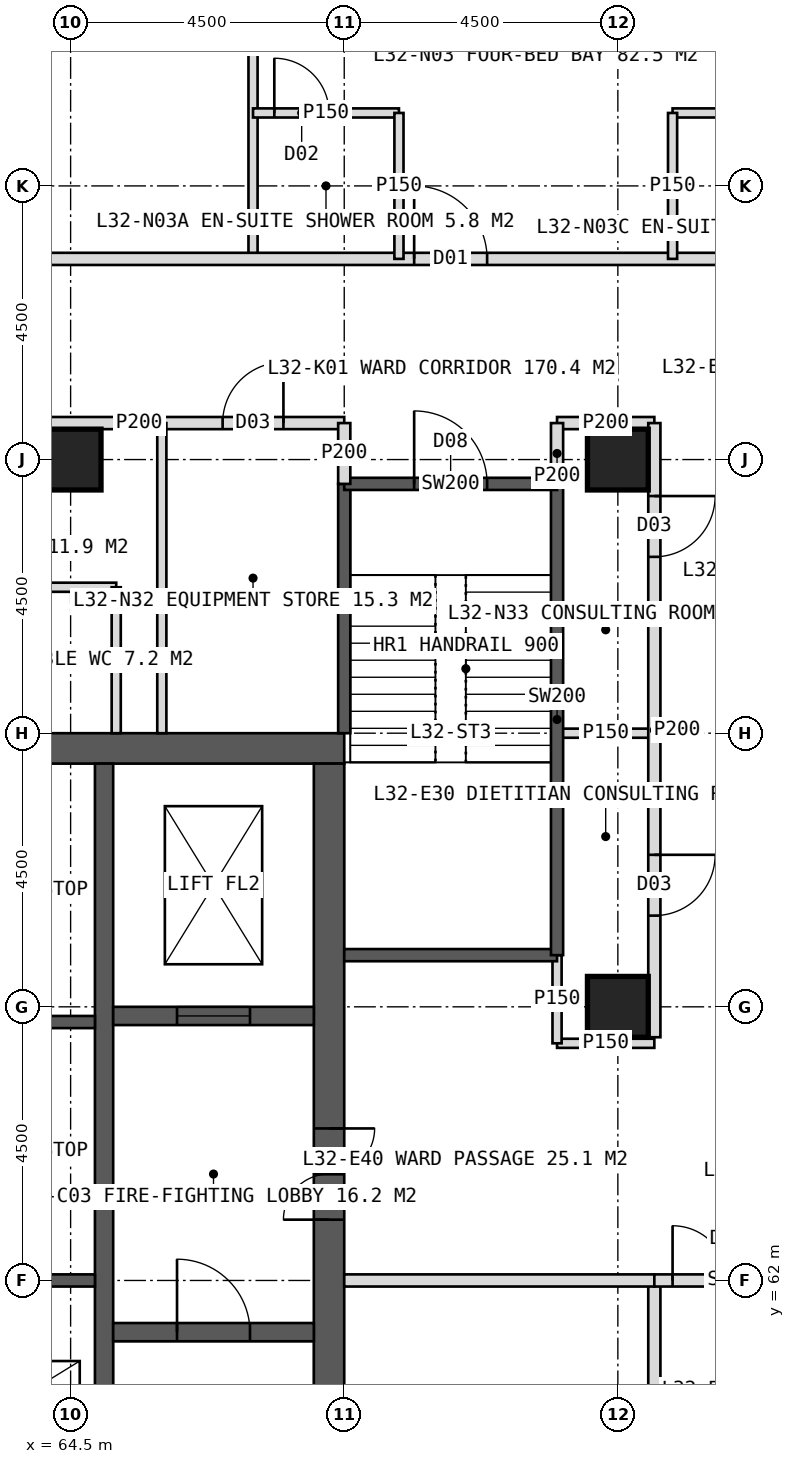
"""IFC4 building model, lengths in metres.
Left out: names, types, materials, properties, quantities, classifications, styles, units other than length and angle.
Written with IfcOpenShell. Run it as: python <this file> out.ifc"""

import sys

from ifc_helpers import new_model, si_unit, direction, frame, frame_2d, origin, origin_2d, place, context, subcontext, project, spatial, rectangle, hollow_rectangle, extrude, element, fill, save


model = new_model("IFC4")
c1 = context("Model", 3, precision=1e-05, world=origin(), true_north=direction((0.0, 1.0)))
c2 = subcontext(c1, "Body", "Model", "MODEL_VIEW")
j1 = project(units=[si_unit("LENGTHUNIT", "METRE"), si_unit("PLANEANGLEUNIT", "RADIAN")], contexts=[c1])
p1 = place(None, origin())
s1 = spatial("IfcSite", under=j1, at=p1, CompositionType="ELEMENT")
p2 = place(p1, origin())
s2 = spatial("IfcBuilding", under=s1, at=p2, CompositionType="ELEMENT")
p3 = place(p2, frame((0.0, 0.0, 136.0)))
s3 = spatial("IfcBuildingStorey", under=s2, at=p3, CompositionType="ELEMENT", Elevation=136.0)
p4 = place(p3, frame((51.0, 70.75, 0.0), z_axis=(0.0, 0.0, 1.0), x_axis=(1.0, 0.0, 0.0)))
e1 = element("IfcWall", 1, at=p4, inside=s3, PredefinedType="SHEAR", context=c2, shape_type="SweptSolid", body=[
    extrude(rectangle(XDim=18.0, YDim=0.5, at=frame_2d((9.0, 0.0))), origin(), (0.0, 0.0, 1.0), 4.0),
])
p5 = place(p4, frame((8.1, 0.0, 0.0)))
e2 = element("IfcOpeningElement", 2, at=p5, cuts=e1, PredefinedType="OPENING", context=c2, shape_type="SweptSolid", body=[
    extrude(rectangle(XDim=1.8, YDim=2.2, at=frame_2d((0.9, 1.1))), frame((0.0, 0.26, 0.0), z_axis=(0.0, -1.0, 0.0), x_axis=(1.0, 0.0, 0.0)), (0.0, 0.0, 1.0), 0.52),
])
p6 = place(p3, frame((68.75, 53.5, 0.0), z_axis=(0.0, 0.0, 1.0), x_axis=(0.0, 1.0, 0.0)))
e3 = element("IfcWall", 3, at=p6, inside=s3, PredefinedType="SHEAR", context=c2, shape_type="SweptSolid", body=[
    extrude(rectangle(XDim=17.0, YDim=0.5, at=frame_2d((8.5, 0.0))), origin(), (0.0, 0.0, 1.0), 4.0),
])
p7 = place(p6, frame((9.5, 0.0, 0.0)))
e4 = element("IfcOpeningElement", 4, at=p7, cuts=e3, PredefinedType="OPENING", context=c2, shape_type="SweptSolid", body=[
    extrude(rectangle(XDim=1.5, YDim=2.2, at=frame_2d((0.75, 1.1))), frame((0.0, 0.26, 0.0), z_axis=(0.0, -1.0, 0.0), x_axis=(1.0, 0.0, 0.0)), (0.0, 0.0, 1.0), 0.52),
])
p8 = place(p3, frame((65.05, 53.5, 0.0), z_axis=(0.0, 0.0, 1.0), x_axis=(0.0, 1.0, 0.0)))
e5 = element("IfcWall", 5, at=p8, inside=s3, PredefinedType="SHEAR", context=c2, shape_type="SweptSolid", body=[
    extrude(rectangle(XDim=17.0, YDim=0.3, at=frame_2d((8.5, 0.0))), origin(), (0.0, 0.0, 1.0), 4.0),
])
for number, where, z_axis, x_axis in (
    (6, (61.85, 62.0, 0.0), (0.0, 0.0, 1.0), (1.0, 0.0, 0.0)),
    (7, (61.85, 66.25, 0.0), (0.0, 0.0, 1.0), (1.0, 0.0, 0.0)),
):
    element("IfcWall", number, at=place(p3, frame(where, z_axis=z_axis, x_axis=x_axis)), inside=s3, PredefinedType="SHEAR", context=c2, shape_type="SweptSolid", body=[
        extrude(rectangle(XDim=3.05, YDim=0.2, at=frame_2d((1.525, 0.0))), origin(), (0.0, 0.0, 1.0), 4.0),
    ])
p9 = place(p3, frame((65.2, 61.15, 0.0), z_axis=(0.0, 0.0, 1.0), x_axis=(1.0, 0.0, 0.0)))
e8 = element("IfcWall", 8, at=p9, inside=s3, PredefinedType="SHEAR", context=c2, shape_type="SweptSolid", body=[
    extrude(rectangle(XDim=3.3, YDim=0.3, at=frame_2d((1.65, 0.0))), origin(), (0.0, 0.0, 1.0), 4.0),
])
p10 = place(p9, frame((1.05, 0.0, 0.0)))
e9 = element("IfcOpeningElement", 9, at=p10, cuts=e8, PredefinedType="OPENING", context=c2, shape_type="SweptSolid", body=[
    extrude(rectangle(XDim=1.2, YDim=2.1, at=frame_2d((0.6, 1.05))), frame((0.0, 0.16, 0.0), z_axis=(0.0, -1.0, 0.0), x_axis=(1.0, 0.0, 0.0)), (0.0, 0.0, 1.0), 0.32),
])
p11 = place(p3, frame((65.2, 66.35, 0.0), z_axis=(0.0, 0.0, 1.0), x_axis=(1.0, 0.0, 0.0)))
e10 = element("IfcWall", 10, at=p11, inside=s3, PredefinedType="SHEAR", context=c2, shape_type="SweptSolid", body=[
    extrude(rectangle(XDim=3.3, YDim=0.3, at=frame_2d((1.65, 0.0))), origin(), (0.0, 0.0, 1.0), 4.0),
])
p12 = place(p11, frame((1.05, 0.0, 0.0)))
e11 = element("IfcOpeningElement", 11, at=p12, cuts=e10, PredefinedType="OPENING", context=c2, shape_type="SweptSolid", body=[
    extrude(rectangle(XDim=1.2, YDim=2.2, at=frame_2d((0.6, 1.1))), frame((0.0, 0.16, 0.0), z_axis=(0.0, -1.0, 0.0), x_axis=(1.0, 0.0, 0.0)), (0.0, 0.0, 1.0), 0.32),
])
for number, where, z_axis, x_axis in (
    (12, (73.5, 75.5, 0.0), (0.0, 0.0, 1.0), (1.0, 0.0, 0.0)),
    (13, (64.5, 75.5, 0.0), (0.0, 0.0, 1.0), (1.0, 0.0, 0.0)),
    (14, (73.5, 66.5, 0.0), (0.0, 0.0, 1.0), (1.0, 0.0, 0.0)),
):
    element("IfcColumn", number, at=place(p3, frame(where, z_axis=z_axis, x_axis=x_axis)), inside=s3, PredefinedType="COLUMN", context=c2, shape_type="SweptSolid", body=[
        extrude(hollow_rectangle(XDim=1.0, YDim=1.0, WallThickness=0.1, at=origin_2d()), origin(), (0.0, 0.0, 1.0), 4.0),
    ])
p13 = place(p3, frame((67.5, 78.8, 0.0), z_axis=(0.0, 0.0, 1.0), x_axis=(0.0, 1.0, 0.0)))
e15 = element("IfcWall", 15, at=p13, inside=s3, PredefinedType="PARTITIONING", context=c2, shape_type="SweptSolid", body=[
    extrude(rectangle(XDim=7.11, YDim=0.15, at=frame_2d((3.555, 0.0))), origin(), (0.0, 0.0, 1.0), 3.75),
])
p14 = place(p3, frame((43.2, 78.8, 0.0), z_axis=(0.0, 0.0, 1.0), x_axis=(1.0, 0.0, 0.0)))
e16 = element("IfcWall", 16, at=p14, inside=s3, PredefinedType="PARTITIONING", context=c2, shape_type="SweptSolid", body=[
    extrude(rectangle(XDim=33.6, YDim=0.2, at=frame_2d((16.8, 0.0))), origin(), (0.0, 0.0, 1.0), 3.75),
])
p15 = place(p14, frame((3.25, 0.0, 0.0)))
e17 = element("IfcOpeningElement", 17, at=p15, cuts=e16, PredefinedType="OPENING", context=c2, shape_type="SweptSolid", body=[
    extrude(rectangle(XDim=1.2, YDim=2.2, at=frame_2d((0.6, 1.1))), frame((0.0, 0.11, 0.0), z_axis=(0.0, -1.0, 0.0), x_axis=(1.0, 0.0, 0.0)), (0.0, 0.0, 1.0), 0.22),
])
p16 = place(p14, frame((12.55, 0.0, 0.0)))
e18 = element("IfcOpeningElement", 18, at=p16, cuts=e16, PredefinedType="OPENING", context=c2, shape_type="SweptSolid", body=[
    extrude(rectangle(XDim=1.2, YDim=2.2, at=frame_2d((0.6, 1.1))), frame((0.0, 0.11, 0.0), z_axis=(0.0, -1.0, 0.0), x_axis=(1.0, 0.0, 0.0)), (0.0, 0.0, 1.0), 0.22),
])
p17 = place(p14, frame((26.95, 0.0, 0.0)))
e19 = element("IfcOpeningElement", 19, at=p17, cuts=e16, PredefinedType="OPENING", context=c2, shape_type="SweptSolid", body=[
    extrude(rectangle(XDim=1.2, YDim=2.2, at=frame_2d((0.6, 1.1))), frame((0.0, 0.11, 0.0), z_axis=(0.0, -1.0, 0.0), x_axis=(1.0, 0.0, 0.0)), (0.0, 0.0, 1.0), 0.22),
])
p18 = place(p3, frame((67.5, 81.2, 0.0), z_axis=(0.0, 0.0, 1.0), x_axis=(1.0, 0.0, 0.0)))
e20 = element("IfcWall", 20, at=p18, inside=s3, PredefinedType="PARTITIONING", context=c2, shape_type="SweptSolid", body=[
    extrude(rectangle(XDim=2.4, YDim=0.15, at=frame_2d((1.2, 0.0))), origin(), (0.0, 0.0, 1.0), 3.75),
])
p19 = place(p18, frame((0.35, 0.0, 0.0)))
e21 = element("IfcOpeningElement", 21, at=p19, cuts=e20, PredefinedType="OPENING", context=c2, shape_type="SweptSolid", body=[
    extrude(rectangle(XDim=0.9, YDim=2.1, at=frame_2d((0.45, 1.05))), frame((0.0, 0.085, 0.0), z_axis=(0.0, -1.0, 0.0), x_axis=(1.0, 0.0, 0.0)), (0.0, 0.0, 1.0), 0.17),
])
p20 = place(p3, frame((69.9, 78.8, 0.0), z_axis=(0.0, 0.0, 1.0), x_axis=(0.0, 1.0, 0.0)))
e22 = element("IfcWall", 22, at=p20, inside=s3, PredefinedType="PARTITIONING", context=c2, shape_type="SweptSolid", body=[
    extrude(rectangle(XDim=2.4, YDim=0.15, at=frame_2d((1.2, 0.0))), origin(), (0.0, 0.0, 1.0), 3.75),
])
p21 = place(p3, frame((74.4, 81.2, 0.0), z_axis=(0.0, 0.0, 1.0), x_axis=(1.0, 0.0, 0.0)))
e23 = element("IfcWall", 23, at=p21, inside=s3, PredefinedType="PARTITIONING", context=c2, shape_type="SweptSolid", body=[
    extrude(rectangle(XDim=2.4, YDim=0.15, at=frame_2d((1.2, 0.0))), origin(), (0.0, 0.0, 1.0), 2.997),
])
p22 = place(p21, frame((1.15, 0.0, 0.0)))
e24 = element("IfcOpeningElement", 24, at=p22, cuts=e23, PredefinedType="OPENING", context=c2, shape_type="SweptSolid", body=[
    extrude(rectangle(XDim=0.9, YDim=2.1, at=frame_2d((0.45, 1.05))), frame((0.0, 0.085, 0.0), z_axis=(0.0, -1.0, 0.0), x_axis=(1.0, 0.0, 0.0)), (0.0, 0.0, 1.0), 0.17),
])
p23 = place(p3, frame((74.4, 78.8, 0.0), z_axis=(0.0, 0.0, 1.0), x_axis=(0.0, 1.0, 0.0)))
e25 = element("IfcWall", 25, at=p23, inside=s3, PredefinedType="PARTITIONING", context=c2, shape_type="SweptSolid", body=[
    extrude(rectangle(XDim=2.4, YDim=0.15, at=frame_2d((1.2, 0.0))), origin(), (0.0, 0.0, 1.0), 3.75),
])
p24 = place(p3, frame((62.25, 76.1, 0.0), z_axis=(0.0, 0.0, 1.0), x_axis=(1.0, 0.0, 0.0)))
e26 = element("IfcWall", 26, at=p24, inside=s3, PredefinedType="PARTITIONING", context=c2, shape_type="SweptSolid", body=[
    extrude(rectangle(XDim=6.75, YDim=0.2, at=frame_2d((3.375, 0.0))), origin(), (0.0, 0.0, 1.0), 3.75),
])
p25 = place(p24, frame((0.325, 0.0, 0.0)))
e27 = element("IfcOpeningElement", 27, at=p25, cuts=e26, PredefinedType="OPENING", context=c2, shape_type="SweptSolid", body=[
    extrude(rectangle(XDim=1.0, YDim=2.1, at=frame_2d((0.5, 1.05))), frame((0.0, 0.11, 0.0), z_axis=(0.0, -1.0, 0.0), x_axis=(1.0, 0.0, 0.0)), (0.0, 0.0, 1.0), 0.22),
])
p26 = place(p24, frame((4.75, 0.0, 0.0)))
e28 = element("IfcOpeningElement", 28, at=p26, cuts=e26, PredefinedType="OPENING", context=c2, shape_type="SweptSolid", body=[
    extrude(rectangle(XDim=1.0, YDim=2.1, at=frame_2d((0.5, 1.05))), frame((0.0, 0.11, 0.0), z_axis=(0.0, -1.0, 0.0), x_axis=(1.0, 0.0, 0.0)), (0.0, 0.0, 1.0), 0.22),
])
p27 = place(p3, frame((72.5, 76.1, 0.0), z_axis=(0.0, 0.0, 1.0), x_axis=(1.0, 0.0, 0.0)))
e29 = element("IfcWall", 29, at=p27, inside=s3, PredefinedType="PARTITIONING", context=c2, shape_type="SweptSolid", body=[
    extrude(rectangle(XDim=1.6, YDim=0.2, at=frame_2d((0.8, 0.0))), origin(), (0.0, 0.0, 1.0), 3.75),
])
p28 = place(p3, frame((66.0, 71.0, 0.0), z_axis=(0.0, 0.0, 1.0), x_axis=(0.0, 1.0, 0.0)))
e30 = element("IfcWall", 30, at=p28, inside=s3, PredefinedType="PARTITIONING", context=c2, shape_type="SweptSolid", body=[
    extrude(rectangle(XDim=5.1, YDim=0.15, at=frame_2d((2.55, 0.0))), origin(), (0.0, 0.0, 1.0), 3.75),
])
p29 = place(p3, frame((62.25, 73.4, 0.0), z_axis=(0.0, 0.0, 1.0), x_axis=(1.0, 0.0, 0.0)))
e31 = element("IfcWall", 31, at=p29, inside=s3, PredefinedType="PARTITIONING", context=c2, shape_type="SweptSolid", body=[
    extrude(rectangle(XDim=3.0, YDim=0.15, at=frame_2d((1.5, 0.0))), origin(), (0.0, 0.0, 1.0), 3.75),
])
p30 = place(p3, frame((65.25, 71.0, 0.0), z_axis=(0.0, 0.0, 1.0), x_axis=(0.0, 1.0, 0.0)))
e32 = element("IfcWall", 32, at=p30, inside=s3, PredefinedType="PARTITIONING", context=c2, shape_type="SweptSolid", body=[
    extrude(rectangle(XDim=2.4, YDim=0.15, at=frame_2d((1.2, 0.0))), origin(), (0.0, 0.0, 1.0), 3.75),
])
p31 = place(p3, frame((72.5, 71.0, 0.0), z_axis=(0.0, 0.0, 1.0), x_axis=(1.0, 0.0, 0.0)))
e33 = element("IfcWall", 33, at=p31, inside=s3, PredefinedType="PARTITIONING", context=c2, shape_type="SweptSolid", body=[
    extrude(rectangle(XDim=1.6, YDim=0.15, at=frame_2d((0.8, 0.0))), origin(), (0.0, 0.0, 1.0), 3.75),
])
p32 = place(p3, frame((74.1, 76.1, 0.0), z_axis=(0.0, 0.0, 1.0), x_axis=(0.0, -1.0, 0.0)))
e34 = element("IfcWall", 34, at=p32, inside=s3, PredefinedType="PARTITIONING", context=c2, shape_type="SweptSolid", body=[
    extrude(rectangle(XDim=10.1, YDim=0.2, at=frame_2d((5.05, 0.0))), origin(), (0.0, 0.0, 1.0), 3.75),
])
p33 = place(p32, frame((1.2, 0.0, 0.0)))
e35 = element("IfcOpeningElement", 35, at=p33, cuts=e34, PredefinedType="OPENING", context=c2, shape_type="SweptSolid", body=[
    extrude(rectangle(XDim=1.0, YDim=2.1, at=frame_2d((0.5, 1.05))), frame((0.0, 0.11, 0.0), z_axis=(0.0, -1.0, 0.0), x_axis=(1.0, 0.0, 0.0)), (0.0, 0.0, 1.0), 0.22),
])
p34 = place(p32, frame((7.1, 0.0, 0.0)))
e36 = element("IfcOpeningElement", 36, at=p34, cuts=e34, PredefinedType="OPENING", context=c2, shape_type="SweptSolid", body=[
    extrude(rectangle(XDim=1.0, YDim=2.1, at=frame_2d((0.5, 1.05))), frame((0.0, 0.11, 0.0), z_axis=(0.0, -1.0, 0.0), x_axis=(1.0, 0.0, 0.0)), (0.0, 0.0, 1.0), 0.22),
])
p35 = place(p3, frame((74.1, 62.0, 0.0), z_axis=(0.0, 0.0, 1.0), x_axis=(0.0, -1.0, 0.0)))
e37 = element("IfcWall", 37, at=p35, inside=s3, PredefinedType="PARTITIONING", context=c2, shape_type="SweptSolid", body=[
    extrude(rectangle(XDim=14.1, YDim=0.2, at=frame_2d((7.05, 0.0))), origin(), (0.0, 0.0, 1.0), 3.75),
])
p36 = place(p35, frame((2.5, 0.0, 0.0)))
e38 = element("IfcOpeningElement", 38, at=p36, cuts=e37, PredefinedType="OPENING", context=c2, shape_type="SweptSolid", body=[
    extrude(rectangle(XDim=1.0, YDim=2.1, at=frame_2d((0.5, 1.05))), frame((0.0, 0.11, 0.0), z_axis=(0.0, -1.0, 0.0), x_axis=(1.0, 0.0, 0.0)), (0.0, 0.0, 1.0), 0.22),
])
p37 = place(p35, frame((7.75, 0.0, 0.0)))
e39 = element("IfcOpeningElement", 39, at=p37, cuts=e37, PredefinedType="OPENING", context=c2, shape_type="SweptSolid", body=[
    extrude(rectangle(XDim=1.0, YDim=2.1, at=frame_2d((0.5, 1.05))), frame((0.0, 0.11, 0.0), z_axis=(0.0, -1.0, 0.0), x_axis=(1.0, 0.0, 0.0)), (0.0, 0.0, 1.0), 0.22),
])
p38 = place(p35, frame((11.2, 0.0, 0.0)))
e40 = element("IfcOpeningElement", 40, at=p38, cuts=e37, PredefinedType="OPENING", context=c2, shape_type="SweptSolid", body=[
    extrude(rectangle(XDim=1.0, YDim=2.1, at=frame_2d((0.5, 1.05))), frame((0.0, 0.11, 0.0), z_axis=(0.0, -1.0, 0.0), x_axis=(1.0, 0.0, 0.0)), (0.0, 0.0, 1.0), 0.22),
])
p39 = place(p3, frame((72.5, 65.9, 0.0), z_axis=(0.0, 0.0, 1.0), x_axis=(1.0, 0.0, 0.0)))
e41 = element("IfcWall", 41, at=p39, inside=s3, PredefinedType="PARTITIONING", context=c2, shape_type="SweptSolid", body=[
    extrude(rectangle(XDim=1.6, YDim=0.15, at=frame_2d((0.8, 0.0))), origin(), (0.0, 0.0, 1.0), 3.75),
])
p40 = place(p3, frame((69.0, 62.0, 0.0), z_axis=(0.0, 0.0, 1.0), x_axis=(1.0, 0.0, 0.0)))
e42 = element("IfcWall", 42, at=p40, inside=s3, PredefinedType="SOLIDWALL", context=c2, shape_type="SweptSolid", body=[
    extrude(rectangle(XDim=5.1, YDim=0.2, at=frame_2d((2.55, 0.0))), origin(), (0.0, 0.0, 1.0), 2.95),
])
p41 = place(p3, frame((74.1, 62.0, 0.0), z_axis=(0.0, 0.0, 1.0), x_axis=(1.0, 0.0, 0.0)))
e43 = element("IfcWall", 43, at=p41, inside=s3, PredefinedType="SOLIDWALL", context=c2, shape_type="SweptSolid", body=[
    extrude(rectangle(XDim=2.7, YDim=0.2, at=frame_2d((1.35, 0.0))), origin(), (0.0, 0.0, 1.0), 2.95),
])
p42 = place(p41, frame((0.3, 0.0, 0.0)))
e44 = element("IfcOpeningElement", 44, at=p42, cuts=e43, PredefinedType="OPENING", context=c2, shape_type="SweptSolid", body=[
    extrude(rectangle(XDim=1.8, YDim=2.2, at=frame_2d((0.9, 1.1))), frame((0.0, 0.11, 0.0), z_axis=(0.0, -1.0, 0.0), x_axis=(1.0, 0.0, 0.0)), (0.0, 0.0, 1.0), 0.22),
])
p43 = place(p3, frame((72.5, 65.9, 0.0), z_axis=(0.0, 0.0, 1.0), x_axis=(0.0, 1.0, 0.0)))
e45 = element("IfcWall", 45, at=p43, inside=s3, PredefinedType="PARTITIONING", context=c2, shape_type="SweptSolid", body=[
    extrude(rectangle(XDim=1.45, YDim=0.15, at=frame_2d((0.725, 0.0))), origin(), (0.0, 0.0, 1.0), 3.75),
])
p44 = place(p3, frame((69.0, 71.0, 0.0), z_axis=(0.0, 0.0, 1.0), x_axis=(0.0, 1.0, 0.0)))
e46 = element("IfcWall", 46, at=p44, inside=s3, PredefinedType="SOLIDWALL", context=c2, shape_type="SweptSolid", body=[
    extrude(rectangle(XDim=4.1, YDim=0.2, at=frame_2d((2.05, 0.0))), origin(), (0.0, 0.0, 1.0), 3.75),
])
p45 = place(p3, frame((69.0, 67.35, 0.0), z_axis=(0.0, 0.0, 1.0), x_axis=(1.0, 0.0, 0.0)))
e47 = element("IfcWall", 47, at=p45, inside=s3, PredefinedType="SOLIDWALL", context=c2, shape_type="SweptSolid", body=[
    extrude(rectangle(XDim=3.5, YDim=0.2, at=frame_2d((1.75, 0.0))), origin(), (0.0, 0.0, 1.0), 3.75),
])
p46 = place(p3, frame((72.5, 67.35, 0.0), z_axis=(0.0, 0.0, 1.0), x_axis=(0.0, 1.0, 0.0)))
e48 = element("IfcWall", 48, at=p46, inside=s3, PredefinedType="SOLIDWALL", context=c2, shape_type="SweptSolid", body=[
    extrude(rectangle(XDim=7.75, YDim=0.2, at=frame_2d((3.875, 0.0))), origin(), (0.0, 0.0, 1.0), 3.75),
])
p47 = place(p3, frame((69.0, 75.1, 0.0), z_axis=(0.0, 0.0, 1.0), x_axis=(1.0, 0.0, 0.0)))
e49 = element("IfcWall", 49, at=p47, inside=s3, PredefinedType="SOLIDWALL", context=c2, shape_type="SweptSolid", body=[
    extrude(rectangle(XDim=3.5, YDim=0.2, at=frame_2d((1.75, 0.0))), origin(), (0.0, 0.0, 1.0), 3.75),
])
p48 = place(p47, frame((1.15, 0.0, 0.0)))
e50 = element("IfcOpeningElement", 50, at=p48, cuts=e49, PredefinedType="OPENING", context=c2, shape_type="SweptSolid", body=[
    extrude(rectangle(XDim=1.2, YDim=2.1, at=frame_2d((0.6, 1.05))), frame((0.0, 0.11, 0.0), z_axis=(0.0, -1.0, 0.0), x_axis=(1.0, 0.0, 0.0)), (0.0, 0.0, 1.0), 0.22),
])
for number, where, z_axis, x_axis in (
    (51, (69.0, 75.1, 0.0), (0.0, 0.0, 1.0), (0.0, 1.0, 0.0)),
    (52, (72.5, 75.1, 0.0), (0.0, 0.0, 1.0), (0.0, 1.0, 0.0)),
):
    element("IfcWall", number, at=place(p3, frame(where, z_axis=z_axis, x_axis=x_axis)), inside=s3, PredefinedType="PARTITIONING", context=c2, shape_type="SweptSolid", body=[
        extrude(rectangle(XDim=1.0, YDim=0.2, at=frame_2d((0.5, 0.0))), origin(), (0.0, 0.0, 1.0), 3.75),
    ])
p49 = place(p17, origin())
e53 = element("IfcDoor", 53, at=p49, inside=s3, OperationType="SINGLE_SWING_LEFT", PredefinedType="DOOR", context=c2, shape_type="SweptSolid", body=[
    extrude(rectangle(XDim=1.2, YDim=2.2, at=frame_2d((0.6, 1.1))), frame((0.0, 0.025, 0.0), z_axis=(0.0, -1.0, 0.0), x_axis=(1.0, 0.0, 0.0)), (0.0, 0.0, 1.0), 0.05),
])
fill(e19, e53)
p50 = place(p19, origin())
e54 = element("IfcDoor", 54, at=p50, inside=s3, OperationType="SINGLE_SWING_LEFT", PredefinedType="DOOR", context=c2, shape_type="SweptSolid", body=[
    extrude(rectangle(XDim=0.9, YDim=2.1, at=frame_2d((0.45, 1.05))), frame((0.0, 0.025, 0.0), z_axis=(0.0, -1.0, 0.0), x_axis=(1.0, 0.0, 0.0)), (0.0, 0.0, 1.0), 0.05),
])
fill(e21, e54)
p51 = place(p26, origin())
e55 = element("IfcDoor", 55, at=p51, inside=s3, OperationType="SINGLE_SWING_RIGHT", PredefinedType="DOOR", context=c2, shape_type="SweptSolid", body=[
    extrude(rectangle(XDim=1.0, YDim=2.1, at=frame_2d((0.5, 1.05))), frame((0.0, 0.025, 0.0), z_axis=(0.0, -1.0, 0.0), x_axis=(1.0, 0.0, 0.0)), (0.0, 0.0, 1.0), 0.05),
])
fill(e28, e55)
p52 = place(p33, origin())
e56 = element("IfcDoor", 56, at=p52, inside=s3, OperationType="SINGLE_SWING_LEFT", PredefinedType="DOOR", context=c2, shape_type="SweptSolid", body=[
    extrude(rectangle(XDim=1.0, YDim=2.1, at=frame_2d((0.5, 1.05))), frame((0.0, 0.025, 0.0), z_axis=(0.0, -1.0, 0.0), x_axis=(1.0, 0.0, 0.0)), (0.0, 0.0, 1.0), 0.05),
])
fill(e35, e56)
p53 = place(p34, origin())
e57 = element("IfcDoor", 57, at=p53, inside=s3, OperationType="SINGLE_SWING_LEFT", PredefinedType="DOOR", context=c2, shape_type="SweptSolid", body=[
    extrude(rectangle(XDim=1.0, YDim=2.1, at=frame_2d((0.5, 1.05))), frame((0.0, 0.025, 0.0), z_axis=(0.0, -1.0, 0.0), x_axis=(1.0, 0.0, 0.0)), (0.0, 0.0, 1.0), 0.05),
])
fill(e36, e57)
p54 = place(p42, origin())
e58 = element("IfcDoor", 58, at=p54, inside=s3, OperationType="DOUBLE_DOOR_DOUBLE_SWING", PredefinedType="DOOR", context=c2, shape_type="SweptSolid", body=[
    extrude(rectangle(XDim=1.8, YDim=2.2, at=frame_2d((0.9, 1.1))), frame((0.0, 0.025, 0.0), z_axis=(0.0, -1.0, 0.0), x_axis=(1.0, 0.0, 0.0)), (0.0, 0.0, 1.0), 0.05),
])
fill(e44, e58)
p55 = place(p7, origin())
e59 = element("IfcDoor", 59, at=p55, inside=s3, OperationType="DOUBLE_DOOR_SINGLE_SWING", PredefinedType="DOOR", context=c2, shape_type="SweptSolid", body=[
    extrude(rectangle(XDim=1.5, YDim=2.2, at=frame_2d((0.75, 1.1))), frame((0.0, 0.025, 0.0), z_axis=(0.0, -1.0, 0.0), x_axis=(1.0, 0.0, 0.0)), (0.0, 0.0, 1.0), 0.05),
])
fill(e4, e59)
p56 = place(p10, origin())
e60 = element("IfcDoor", 60, at=p56, inside=s3, OperationType="SINGLE_SWING_LEFT", PredefinedType="DOOR", context=c2, shape_type="SweptSolid", body=[
    extrude(rectangle(XDim=1.2, YDim=2.1, at=frame_2d((0.6, 1.05))), frame((0.0, 0.025, 0.0), z_axis=(0.0, -1.0, 0.0), x_axis=(1.0, 0.0, 0.0)), (0.0, 0.0, 1.0), 0.05),
])
fill(e9, e60)
p57 = place(p12, origin())
e61 = element("IfcDoor", 61, at=p57, inside=s3, OperationType="SLIDING_TO_LEFT", PredefinedType="DOOR", context=c2, shape_type="SweptSolid", body=[
    extrude(rectangle(XDim=1.2, YDim=2.2, at=frame_2d((0.6, 1.1))), frame((0.0, 0.025, 0.0), z_axis=(0.0, -1.0, 0.0), x_axis=(1.0, 0.0, 0.0)), (0.0, 0.0, 1.0), 0.05),
])
fill(e11, e61)
p58 = place(p48, origin())
e62 = element("IfcDoor", 62, at=p58, inside=s3, OperationType="SINGLE_SWING_LEFT", PredefinedType="DOOR", context=c2, shape_type="SweptSolid", body=[
    extrude(rectangle(XDim=1.2, YDim=2.1, at=frame_2d((0.6, 1.05))), frame((0.0, 0.025, 0.0), z_axis=(0.0, -1.0, 0.0), x_axis=(1.0, 0.0, 0.0)), (0.0, 0.0, 1.0), 0.05),
])
fill(e50, e62)
save(model, sys.argv[1])
